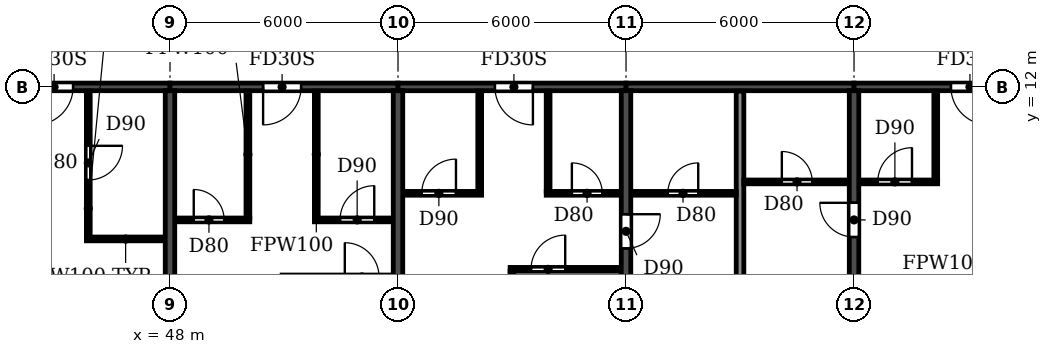
"""IFC4 building model, lengths in metres.
Left out: names, types, materials, properties, quantities, classifications, styles, units other than length and angle.
Written with IfcOpenShell. Run it as: python <this file> out.ifc"""

import sys

from ifc_helpers import new_model, si_unit, direction, frame, frame_2d, origin, place, context, subcontext, project, spatial, rectangle, extrude, element, fill, save


model = new_model("IFC4")
c1 = context("Model", 3, precision=1e-05, world=origin(), true_north=direction((0.0, 1.0)))
c2 = subcontext(c1, "Body", "Model", "MODEL_VIEW")
j1 = project(units=[si_unit("LENGTHUNIT", "METRE"), si_unit("PLANEANGLEUNIT", "RADIAN")], contexts=[c1])
p1 = place(None, origin())
s1 = spatial("IfcSite", under=j1, at=p1, CompositionType="ELEMENT")
p2 = place(p1, origin())
s2 = spatial("IfcBuilding", under=s1, at=p2, CompositionType="ELEMENT")
p3 = place(p2, frame((0.0, 0.0, 208.2)))
s3 = spatial("IfcBuildingStorey", under=s2, at=p3, CompositionType="ELEMENT", Elevation=208.2)
for number, where, z_axis, x_axis in (
    (1, (48.0, 0.2, 0.0), (0.0, 0.0, 1.0), (0.0, 1.0, 0.0)),
    (2, (54.0, 0.2, 0.0), (0.0, 0.0, 1.0), (0.0, 1.0, 0.0)),
):
    element("IfcWall", number, at=place(p3, frame(where, z_axis=z_axis, x_axis=x_axis)), inside=s3, PredefinedType="SHEAR", context=c2, shape_type="SweptSolid", body=[
        extrude(rectangle(XDim=11.7, YDim=0.25, at=frame_2d((5.85, 0.0))), origin(), (0.0, 0.0, 1.0), 3.0),
    ])
p4 = place(p3, frame((60.0, 0.2, 0.0), z_axis=(0.0, 0.0, 1.0), x_axis=(0.0, 1.0, 0.0)))
e3 = element("IfcWall", 3, at=p4, inside=s3, PredefinedType="SHEAR", context=c2, shape_type="SweptSolid", body=[
    extrude(rectangle(XDim=11.7, YDim=0.25, at=frame_2d((5.85, 0.0))), origin(), (0.0, 0.0, 1.0), 3.0),
])
p5 = place(p4, frame((7.55, 0.0, 0.0)))
e4 = element("IfcOpeningElement", 4, at=p5, cuts=e3, PredefinedType="OPENING", context=c2, shape_type="SweptSolid", body=[
    extrude(rectangle(XDim=0.9, YDim=2.1, at=frame_2d((0.45, 1.05))), frame((0.0, 0.135, 0.0), z_axis=(0.0, -1.0, 0.0), x_axis=(1.0, 0.0, 0.0)), (0.0, 0.0, 1.0), 0.27),
])
p6 = place(p3, frame((66.0, 0.2, 0.0), z_axis=(0.0, 0.0, 1.0), x_axis=(0.0, 1.0, 0.0)))
e5 = element("IfcWall", 5, at=p6, inside=s3, PredefinedType="SHEAR", context=c2, shape_type="SweptSolid", body=[
    extrude(rectangle(XDim=11.7, YDim=0.25, at=frame_2d((5.85, 0.0))), origin(), (0.0, 0.0, 1.0), 3.0),
])
p7 = place(p6, frame((7.85, 0.0, 0.0)))
e6 = element("IfcOpeningElement", 6, at=p7, cuts=e5, PredefinedType="OPENING", context=c2, shape_type="SweptSolid", body=[
    extrude(rectangle(XDim=0.9, YDim=2.1, at=frame_2d((0.45, 1.05))), frame((0.0, 0.135, 0.0), z_axis=(0.0, -1.0, 0.0), x_axis=(1.0, 0.0, 0.0)), (0.0, 0.0, 1.0), 0.27),
])
p8 = place(p3, frame((42.0, 12.0, 0.0), z_axis=(0.0, 0.0, 1.0), x_axis=(1.0, 0.0, 0.0)))
e7 = element("IfcWall", 7, at=p8, inside=s3, PredefinedType="SHEAR", context=c2, shape_type="SweptSolid", body=[
    extrude(rectangle(XDim=6.0, YDim=0.2, at=frame_2d((3.0, 0.0))), origin(), (0.0, 0.0, 1.0), 2.4),
])
p9 = place(p8, frame((2.45, 0.0, 0.0)))
e8 = element("IfcOpeningElement", 8, at=p9, cuts=e7, PredefinedType="OPENING", context=c2, shape_type="SweptSolid", body=[
    extrude(rectangle(XDim=1.0, YDim=2.1, at=frame_2d((0.5, 1.05))), frame((0.0, 0.11, 0.0), z_axis=(0.0, -1.0, 0.0), x_axis=(1.0, 0.0, 0.0)), (0.0, 0.0, 1.0), 0.22),
])
p10 = place(p3, frame((48.0, 12.0, 0.0), z_axis=(0.0, 0.0, 1.0), x_axis=(1.0, 0.0, 0.0)))
e9 = element("IfcWall", 9, at=p10, inside=s3, PredefinedType="SHEAR", context=c2, shape_type="SweptSolid", body=[
    extrude(rectangle(XDim=6.0, YDim=0.2, at=frame_2d((3.0, 0.0))), origin(), (0.0, 0.0, 1.0), 2.4),
])
p11 = place(p10, frame((2.45, 0.0, 0.0)))
e10 = element("IfcOpeningElement", 10, at=p11, cuts=e9, PredefinedType="OPENING", context=c2, shape_type="SweptSolid", body=[
    extrude(rectangle(XDim=1.0, YDim=2.1, at=frame_2d((0.5, 1.05))), frame((0.0, 0.11, 0.0), z_axis=(0.0, -1.0, 0.0), x_axis=(1.0, 0.0, 0.0)), (0.0, 0.0, 1.0), 0.22),
])
p12 = place(p3, frame((54.0, 12.0, 0.0), z_axis=(0.0, 0.0, 1.0), x_axis=(1.0, 0.0, 0.0)))
e11 = element("IfcWall", 11, at=p12, inside=s3, PredefinedType="SHEAR", context=c2, shape_type="SweptSolid", body=[
    extrude(rectangle(XDim=6.0, YDim=0.2, at=frame_2d((3.0, 0.0))), origin(), (0.0, 0.0, 1.0), 2.4),
])
p13 = place(p12, frame((2.55, 0.0, 0.0)))
e12 = element("IfcOpeningElement", 12, at=p13, cuts=e11, PredefinedType="OPENING", context=c2, shape_type="SweptSolid", body=[
    extrude(rectangle(XDim=1.0, YDim=2.1, at=frame_2d((0.5, 1.05))), frame((0.0, 0.11, 0.0), z_axis=(0.0, -1.0, 0.0), x_axis=(1.0, 0.0, 0.0)), (0.0, 0.0, 1.0), 0.22),
])
p14 = place(p3, frame((60.0, 12.0, 0.0), z_axis=(0.0, 0.0, 1.0), x_axis=(1.0, 0.0, 0.0)))
e13 = element("IfcWall", 13, at=p14, inside=s3, PredefinedType="SHEAR", context=c2, shape_type="SweptSolid", body=[
    extrude(rectangle(XDim=6.0, YDim=0.2, at=frame_2d((3.0, 0.0))), origin(), (0.0, 0.0, 1.0), 2.4),
])
p15 = place(p3, frame((66.0, 12.0, 0.0), z_axis=(0.0, 0.0, 1.0), x_axis=(1.0, 0.0, 0.0)))
e14 = element("IfcWall", 14, at=p15, inside=s3, PredefinedType="SHEAR", context=c2, shape_type="SweptSolid", body=[
    extrude(rectangle(XDim=6.0, YDim=0.2, at=frame_2d((3.0, 0.0))), origin(), (0.0, 0.0, 1.0), 2.4),
])
p16 = place(p15, frame((2.55, 0.0, 0.0)))
e15 = element("IfcOpeningElement", 15, at=p16, cuts=e14, PredefinedType="OPENING", context=c2, shape_type="SweptSolid", body=[
    extrude(rectangle(XDim=1.0, YDim=2.1, at=frame_2d((0.5, 1.05))), frame((0.0, 0.11, 0.0), z_axis=(0.0, -1.0, 0.0), x_axis=(1.0, 0.0, 0.0)), (0.0, 0.0, 1.0), 0.22),
])
p17 = place(p3, frame((63.0, 0.06, 0.0), z_axis=(0.0, 0.0, 1.0), x_axis=(0.0, 1.0, 0.0)))
e16 = element("IfcWall", 16, at=p17, inside=s3, PredefinedType="PARTITIONING", context=c2, shape_type="SweptSolid", body=[
    extrude(rectangle(XDim=11.83, YDim=0.2, at=frame_2d((5.915, 0.0))), origin(), (0.0, 0.0, 1.0), 3.0),
])
p18 = place(p3, frame((56.95, 7.2, 0.0), z_axis=(0.0, 0.0, 1.0), x_axis=(1.0, 0.0, 0.0)))
e17 = element("IfcWall", 17, at=p18, inside=s3, PredefinedType="PARTITIONING", context=c2, shape_type="SweptSolid", body=[
    extrude(rectangle(XDim=2.915, YDim=0.1, at=frame_2d((1.458, 0.0))), origin(), (0.0, 0.0, 1.0), 3.0),
])
p19 = place(p18, frame((0.55, 0.0, 0.0)))
e18 = element("IfcOpeningElement", 18, at=p19, cuts=e17, PredefinedType="OPENING", context=c2, shape_type="SweptSolid", body=[
    extrude(rectangle(XDim=0.9, YDim=2.1, at=frame_2d((0.45, 1.05))), frame((0.0, 0.06, 0.0), z_axis=(0.0, -1.0, 0.0), x_axis=(1.0, 0.0, 0.0)), (0.0, 0.0, 1.0), 0.12),
])
p20 = place(p3, frame((45.8, 8.0, 0.0), z_axis=(0.0, 0.0, 1.0), x_axis=(1.0, 0.0, 0.0)))
e19 = element("IfcWall", 19, at=p20, inside=s3, PredefinedType="PARTITIONING", context=c2, shape_type="SweptSolid", body=[
    extrude(rectangle(XDim=2.065, YDim=0.1, at=frame_2d((1.032, 0.0))), origin(), (0.0, 0.0, 1.0), 3.0),
])
p21 = place(p3, frame((48.135, 8.5, 0.0), z_axis=(0.0, 0.0, 1.0), x_axis=(1.0, 0.0, 0.0)))
e20 = element("IfcWall", 20, at=p21, inside=s3, PredefinedType="PARTITIONING", context=c2, shape_type="SweptSolid", body=[
    extrude(rectangle(XDim=1.965, YDim=0.1, at=frame_2d((0.982, 0.0))), origin(), (0.0, 0.0, 1.0), 3.0),
])
p22 = place(p21, frame((0.49, 0.0, 0.0)))
e21 = element("IfcOpeningElement", 21, at=p22, cuts=e20, PredefinedType="OPENING", context=c2, shape_type="SweptSolid", body=[
    extrude(rectangle(XDim=0.8, YDim=2.1, at=frame_2d((0.4, 1.05))), frame((0.0, 0.06, 0.0), z_axis=(0.0, -1.0, 0.0), x_axis=(1.0, 0.0, 0.0)), (0.0, 0.0, 1.0), 0.12),
])
p23 = place(p3, frame((51.8, 8.5, 0.0), z_axis=(0.0, 0.0, 1.0), x_axis=(1.0, 0.0, 0.0)))
e22 = element("IfcWall", 22, at=p23, inside=s3, PredefinedType="PARTITIONING", context=c2, shape_type="SweptSolid", body=[
    extrude(rectangle(XDim=2.065, YDim=0.1, at=frame_2d((1.032, 0.0))), origin(), (0.0, 0.0, 1.0), 3.0),
])
p24 = place(p23, frame((0.675, 0.0, 0.0)))
e23 = element("IfcOpeningElement", 23, at=p24, cuts=e22, PredefinedType="OPENING", context=c2, shape_type="SweptSolid", body=[
    extrude(rectangle(XDim=0.9, YDim=2.1, at=frame_2d((0.45, 1.05))), frame((0.0, 0.06, 0.0), z_axis=(0.0, -1.0, 0.0), x_axis=(1.0, 0.0, 0.0)), (0.0, 0.0, 1.0), 0.12),
])
p25 = place(p3, frame((54.135, 9.2, 0.0), z_axis=(0.0, 0.0, 1.0), x_axis=(1.0, 0.0, 0.0)))
e24 = element("IfcWall", 24, at=p25, inside=s3, PredefinedType="PARTITIONING", context=c2, shape_type="SweptSolid", body=[
    extrude(rectangle(XDim=2.065, YDim=0.1, at=frame_2d((1.032, 0.0))), origin(), (0.0, 0.0, 1.0), 3.0),
])
p26 = place(p25, frame((0.49, 0.0, 0.0)))
e25 = element("IfcOpeningElement", 25, at=p26, cuts=e24, PredefinedType="OPENING", context=c2, shape_type="SweptSolid", body=[
    extrude(rectangle(XDim=0.9, YDim=2.1, at=frame_2d((0.45, 1.05))), frame((0.0, 0.06, 0.0), z_axis=(0.0, -1.0, 0.0), x_axis=(1.0, 0.0, 0.0)), (0.0, 0.0, 1.0), 0.12),
])
p27 = place(p3, frame((57.9, 9.2, 0.0), z_axis=(0.0, 0.0, 1.0), x_axis=(1.0, 0.0, 0.0)))
e26 = element("IfcWall", 26, at=p27, inside=s3, PredefinedType="PARTITIONING", context=c2, shape_type="SweptSolid", body=[
    extrude(rectangle(XDim=1.965, YDim=0.1, at=frame_2d((0.982, 0.0))), origin(), (0.0, 0.0, 1.0), 3.0),
])
p28 = place(p27, frame((0.675, 0.0, 0.0)))
e27 = element("IfcOpeningElement", 27, at=p28, cuts=e26, PredefinedType="OPENING", context=c2, shape_type="SweptSolid", body=[
    extrude(rectangle(XDim=0.8, YDim=2.1, at=frame_2d((0.4, 1.05))), frame((0.0, 0.06, 0.0), z_axis=(0.0, -1.0, 0.0), x_axis=(1.0, 0.0, 0.0)), (0.0, 0.0, 1.0), 0.12),
])
p29 = place(p3, frame((60.135, 9.2, 0.0), z_axis=(0.0, 0.0, 1.0), x_axis=(1.0, 0.0, 0.0)))
e28 = element("IfcWall", 28, at=p29, inside=s3, PredefinedType="PARTITIONING", context=c2, shape_type="SweptSolid", body=[
    extrude(rectangle(XDim=2.765, YDim=0.1, at=frame_2d((1.382, 0.0))), origin(), (0.0, 0.0, 1.0), 3.0),
])
p30 = place(p29, frame((0.965, 0.0, 0.0)))
e29 = element("IfcOpeningElement", 29, at=p30, cuts=e28, PredefinedType="OPENING", context=c2, shape_type="SweptSolid", body=[
    extrude(rectangle(XDim=0.8, YDim=2.1, at=frame_2d((0.4, 1.05))), frame((0.0, 0.06, 0.0), z_axis=(0.0, -1.0, 0.0), x_axis=(1.0, 0.0, 0.0)), (0.0, 0.0, 1.0), 0.12),
])
p31 = place(p3, frame((63.1, 9.5, 0.0), z_axis=(0.0, 0.0, 1.0), x_axis=(1.0, 0.0, 0.0)))
e30 = element("IfcWall", 30, at=p31, inside=s3, PredefinedType="PARTITIONING", context=c2, shape_type="SweptSolid", body=[
    extrude(rectangle(XDim=2.765, YDim=0.1, at=frame_2d((1.382, 0.0))), origin(), (0.0, 0.0, 1.0), 3.0),
])
p32 = place(p31, frame((1.0, 0.0, 0.0)))
e31 = element("IfcOpeningElement", 31, at=p32, cuts=e30, PredefinedType="OPENING", context=c2, shape_type="SweptSolid", body=[
    extrude(rectangle(XDim=0.8, YDim=2.1, at=frame_2d((0.4, 1.05))), frame((0.0, 0.06, 0.0), z_axis=(0.0, -1.0, 0.0), x_axis=(1.0, 0.0, 0.0)), (0.0, 0.0, 1.0), 0.12),
])
p33 = place(p3, frame((66.135, 9.5, 0.0), z_axis=(0.0, 0.0, 1.0), x_axis=(1.0, 0.0, 0.0)))
e32 = element("IfcWall", 32, at=p33, inside=s3, PredefinedType="PARTITIONING", context=c2, shape_type="SweptSolid", body=[
    extrude(rectangle(XDim=2.065, YDim=0.1, at=frame_2d((1.032, 0.0))), origin(), (0.0, 0.0, 1.0), 3.0),
])
p34 = place(p33, frame((0.49, 0.0, 0.0)))
e33 = element("IfcOpeningElement", 33, at=p34, cuts=e32, PredefinedType="OPENING", context=c2, shape_type="SweptSolid", body=[
    extrude(rectangle(XDim=0.9, YDim=2.1, at=frame_2d((0.45, 1.05))), frame((0.0, 0.06, 0.0), z_axis=(0.0, -1.0, 0.0), x_axis=(1.0, 0.0, 0.0)), (0.0, 0.0, 1.0), 0.12),
])
p35 = place(p3, frame((45.85, 8.05, 0.0), z_axis=(0.0, 0.0, 1.0), x_axis=(0.0, 1.0, 0.0)))
e34 = element("IfcWall", 34, at=p35, inside=s3, PredefinedType="PARTITIONING", context=c2, shape_type="SweptSolid", body=[
    extrude(rectangle(XDim=3.84, YDim=0.1, at=frame_2d((1.92, 0.0))), origin(), (0.0, 0.0, 1.0), 3.0),
])
p36 = place(p35, frame((1.5, 0.0, 0.0)))
e35 = element("IfcOpeningElement", 35, at=p36, cuts=e34, PredefinedType="OPENING", context=c2, shape_type="SweptSolid", body=[
    extrude(rectangle(XDim=0.9, YDim=2.1, at=frame_2d((0.45, 1.05))), frame((0.0, 0.06, 0.0), z_axis=(0.0, -1.0, 0.0), x_axis=(1.0, 0.0, 0.0)), (0.0, 0.0, 1.0), 0.12),
])
for number, where, z_axis, x_axis in (
    (36, (50.05, 8.55, 0.0), (0.0, 0.0, 1.0), (0.0, 1.0, 0.0)),
    (37, (51.85, 8.55, 0.0), (0.0, 0.0, 1.0), (0.0, 1.0, 0.0)),
):
    element("IfcWall", number, at=place(p3, frame(where, z_axis=z_axis, x_axis=x_axis)), inside=s3, PredefinedType="PARTITIONING", context=c2, shape_type="SweptSolid", body=[
        extrude(rectangle(XDim=3.34, YDim=0.1, at=frame_2d((1.67, 0.0))), origin(), (0.0, 0.0, 1.0), 3.0),
    ])
p37 = place(p3, frame((56.15, 9.25, 0.0), z_axis=(0.0, 0.0, 1.0), x_axis=(0.0, 1.0, 0.0)))
e38 = element("IfcWall", 38, at=p37, inside=s3, PredefinedType="PARTITIONING", context=c2, shape_type="SweptSolid", body=[
    extrude(rectangle(XDim=2.64, YDim=0.1, at=frame_2d((1.32, 0.0))), origin(), (0.0, 0.0, 1.0), 3.0),
])
p38 = place(p3, frame((57.0, 0.06, 0.0), z_axis=(0.0, 0.0, 1.0), x_axis=(0.0, 1.0, 0.0)))
e39 = element("IfcWall", 39, at=p38, inside=s3, PredefinedType="PARTITIONING", context=c2, shape_type="SweptSolid", body=[
    extrude(rectangle(XDim=7.09, YDim=0.1, at=frame_2d((3.545, 0.0))), origin(), (0.0, 0.0, 1.0), 3.0),
])
p39 = place(p3, frame((57.95, 9.25, 0.0), z_axis=(0.0, 0.0, 1.0), x_axis=(0.0, 1.0, 0.0)))
e40 = element("IfcWall", 40, at=p39, inside=s3, PredefinedType="PARTITIONING", context=c2, shape_type="SweptSolid", body=[
    extrude(rectangle(XDim=2.64, YDim=0.1, at=frame_2d((1.32, 0.0))), origin(), (0.0, 0.0, 1.0), 3.0),
])
p40 = place(p3, frame((68.15, 9.55, 0.0), z_axis=(0.0, 0.0, 1.0), x_axis=(0.0, 1.0, 0.0)))
e41 = element("IfcWall", 41, at=p40, inside=s3, PredefinedType="PARTITIONING", context=c2, shape_type="SweptSolid", body=[
    extrude(rectangle(XDim=2.34, YDim=0.1, at=frame_2d((1.17, 0.0))), origin(), (0.0, 0.0, 1.0), 3.0),
])
p41 = place(p9, frame((1.0, 0.0, 0.0), z_axis=(0.0, 0.0, 1.0), x_axis=(-1.0, 0.0, 0.0)))
e42 = element("IfcDoor", 42, at=p41, inside=s3, OperationType="SINGLE_SWING_RIGHT", PredefinedType="DOOR", context=c2, shape_type="SweptSolid", body=[
    extrude(rectangle(XDim=1.0, YDim=2.1, at=frame_2d((0.5, 1.05))), frame((0.0, 0.025, 0.0), z_axis=(0.0, -1.0, 0.0), x_axis=(1.0, 0.0, 0.0)), (0.0, 0.0, 1.0), 0.05),
])
fill(e8, e42)
p42 = place(p36, frame((0.9, 0.0, 0.0), z_axis=(0.0, 0.0, 1.0), x_axis=(-1.0, 0.0, 0.0)))
e43 = element("IfcDoor", 43, at=p42, inside=s3, OperationType="SINGLE_SWING_LEFT", PredefinedType="DOOR", context=c2, shape_type="SweptSolid", body=[
    extrude(rectangle(XDim=0.9, YDim=2.1, at=frame_2d((0.45, 1.05))), frame((0.0, 0.025, 0.0), z_axis=(0.0, -1.0, 0.0), x_axis=(1.0, 0.0, 0.0)), (0.0, 0.0, 1.0), 0.05),
])
fill(e35, e43)
p43 = place(p22, origin())
e44 = element("IfcDoor", 44, at=p43, inside=s3, OperationType="SINGLE_SWING_LEFT", PredefinedType="DOOR", context=c2, shape_type="SweptSolid", body=[
    extrude(rectangle(XDim=0.8, YDim=2.1, at=frame_2d((0.4, 1.05))), frame((0.0, 0.025, 0.0), z_axis=(0.0, -1.0, 0.0), x_axis=(1.0, 0.0, 0.0)), (0.0, 0.0, 1.0), 0.05),
])
fill(e21, e44)
p44 = place(p11, frame((1.0, 0.0, 0.0), z_axis=(0.0, 0.0, 1.0), x_axis=(-1.0, 0.0, 0.0)))
e45 = element("IfcDoor", 45, at=p44, inside=s3, OperationType="SINGLE_SWING_RIGHT", PredefinedType="DOOR", context=c2, shape_type="SweptSolid", body=[
    extrude(rectangle(XDim=1.0, YDim=2.1, at=frame_2d((0.5, 1.05))), frame((0.0, 0.025, 0.0), z_axis=(0.0, -1.0, 0.0), x_axis=(1.0, 0.0, 0.0)), (0.0, 0.0, 1.0), 0.05),
])
fill(e10, e45)
p45 = place(p24, origin())
e46 = element("IfcDoor", 46, at=p45, inside=s3, OperationType="SINGLE_SWING_RIGHT", PredefinedType="DOOR", context=c2, shape_type="SweptSolid", body=[
    extrude(rectangle(XDim=0.9, YDim=2.1, at=frame_2d((0.45, 1.05))), frame((0.0, 0.025, 0.0), z_axis=(0.0, -1.0, 0.0), x_axis=(1.0, 0.0, 0.0)), (0.0, 0.0, 1.0), 0.05),
])
fill(e23, e46)
p46 = place(p30, origin())
e47 = element("IfcDoor", 47, at=p46, inside=s3, OperationType="SINGLE_SWING_RIGHT", PredefinedType="DOOR", context=c2, shape_type="SweptSolid", body=[
    extrude(rectangle(XDim=0.8, YDim=2.1, at=frame_2d((0.4, 1.05))), frame((0.0, 0.025, 0.0), z_axis=(0.0, -1.0, 0.0), x_axis=(1.0, 0.0, 0.0)), (0.0, 0.0, 1.0), 0.05),
])
fill(e29, e47)
p47 = place(p26, origin())
e48 = element("IfcDoor", 48, at=p47, inside=s3, OperationType="SINGLE_SWING_RIGHT", PredefinedType="DOOR", context=c2, shape_type="SweptSolid", body=[
    extrude(rectangle(XDim=0.9, YDim=2.1, at=frame_2d((0.45, 1.05))), frame((0.0, 0.025, 0.0), z_axis=(0.0, -1.0, 0.0), x_axis=(1.0, 0.0, 0.0)), (0.0, 0.0, 1.0), 0.05),
])
fill(e25, e48)
p48 = place(p13, frame((1.0, 0.0, 0.0), z_axis=(0.0, 0.0, 1.0), x_axis=(-1.0, 0.0, 0.0)))
e49 = element("IfcDoor", 49, at=p48, inside=s3, OperationType="SINGLE_SWING_LEFT", PredefinedType="DOOR", context=c2, shape_type="SweptSolid", body=[
    extrude(rectangle(XDim=1.0, YDim=2.1, at=frame_2d((0.5, 1.05))), frame((0.0, 0.025, 0.0), z_axis=(0.0, -1.0, 0.0), x_axis=(1.0, 0.0, 0.0)), (0.0, 0.0, 1.0), 0.05),
])
fill(e12, e49)
p49 = place(p19, origin())
e50 = element("IfcDoor", 50, at=p49, inside=s3, OperationType="SINGLE_SWING_RIGHT", PredefinedType="DOOR", context=c2, shape_type="SweptSolid", body=[
    extrude(rectangle(XDim=0.9, YDim=2.1, at=frame_2d((0.45, 1.05))), frame((0.0, 0.025, 0.0), z_axis=(0.0, -1.0, 0.0), x_axis=(1.0, 0.0, 0.0)), (0.0, 0.0, 1.0), 0.05),
])
fill(e18, e50)
p50 = place(p28, origin())
e51 = element("IfcDoor", 51, at=p50, inside=s3, OperationType="SINGLE_SWING_LEFT", PredefinedType="DOOR", context=c2, shape_type="SweptSolid", body=[
    extrude(rectangle(XDim=0.8, YDim=2.1, at=frame_2d((0.4, 1.05))), frame((0.0, 0.025, 0.0), z_axis=(0.0, -1.0, 0.0), x_axis=(1.0, 0.0, 0.0)), (0.0, 0.0, 1.0), 0.05),
])
fill(e27, e51)
p51 = place(p5, frame((0.9, 0.0, 0.0), z_axis=(0.0, 0.0, 1.0), x_axis=(-1.0, 0.0, 0.0)))
e52 = element("IfcDoor", 52, at=p51, inside=s3, OperationType="SINGLE_SWING_LEFT", PredefinedType="DOOR", context=c2, shape_type="SweptSolid", body=[
    extrude(rectangle(XDim=0.9, YDim=2.1, at=frame_2d((0.45, 1.05))), frame((0.0, 0.025, 0.0), z_axis=(0.0, -1.0, 0.0), x_axis=(1.0, 0.0, 0.0)), (0.0, 0.0, 1.0), 0.05),
])
fill(e4, e52)
p52 = place(p32, origin())
e53 = element("IfcDoor", 53, at=p52, inside=s3, OperationType="SINGLE_SWING_LEFT", PredefinedType="DOOR", context=c2, shape_type="SweptSolid", body=[
    extrude(rectangle(XDim=0.8, YDim=2.1, at=frame_2d((0.4, 1.05))), frame((0.0, 0.025, 0.0), z_axis=(0.0, -1.0, 0.0), x_axis=(1.0, 0.0, 0.0)), (0.0, 0.0, 1.0), 0.05),
])
fill(e31, e53)
p53 = place(p7, origin())
e54 = element("IfcDoor", 54, at=p53, inside=s3, OperationType="SINGLE_SWING_RIGHT", PredefinedType="DOOR", context=c2, shape_type="SweptSolid", body=[
    extrude(rectangle(XDim=0.9, YDim=2.1, at=frame_2d((0.45, 1.05))), frame((0.0, 0.025, 0.0), z_axis=(0.0, -1.0, 0.0), x_axis=(1.0, 0.0, 0.0)), (0.0, 0.0, 1.0), 0.05),
])
fill(e6, e54)
p54 = place(p34, origin())
e55 = element("IfcDoor", 55, at=p54, inside=s3, OperationType="SINGLE_SWING_RIGHT", PredefinedType="DOOR", context=c2, shape_type="SweptSolid", body=[
    extrude(rectangle(XDim=0.9, YDim=2.1, at=frame_2d((0.45, 1.05))), frame((0.0, 0.025, 0.0), z_axis=(0.0, -1.0, 0.0), x_axis=(1.0, 0.0, 0.0)), (0.0, 0.0, 1.0), 0.05),
])
fill(e33, e55)
p55 = place(p16, frame((1.0, 0.0, 0.0), z_axis=(0.0, 0.0, 1.0), x_axis=(-1.0, 0.0, 0.0)))
e56 = element("IfcDoor", 56, at=p55, inside=s3, OperationType="SINGLE_SWING_LEFT", PredefinedType="DOOR", context=c2, shape_type="SweptSolid", body=[
    extrude(rectangle(XDim=1.0, YDim=2.1, at=frame_2d((0.5, 1.05))), frame((0.0, 0.025, 0.0), z_axis=(0.0, -1.0, 0.0), x_axis=(1.0, 0.0, 0.0)), (0.0, 0.0, 1.0), 0.05),
])
fill(e15, e56)
save(model, sys.argv[1])
